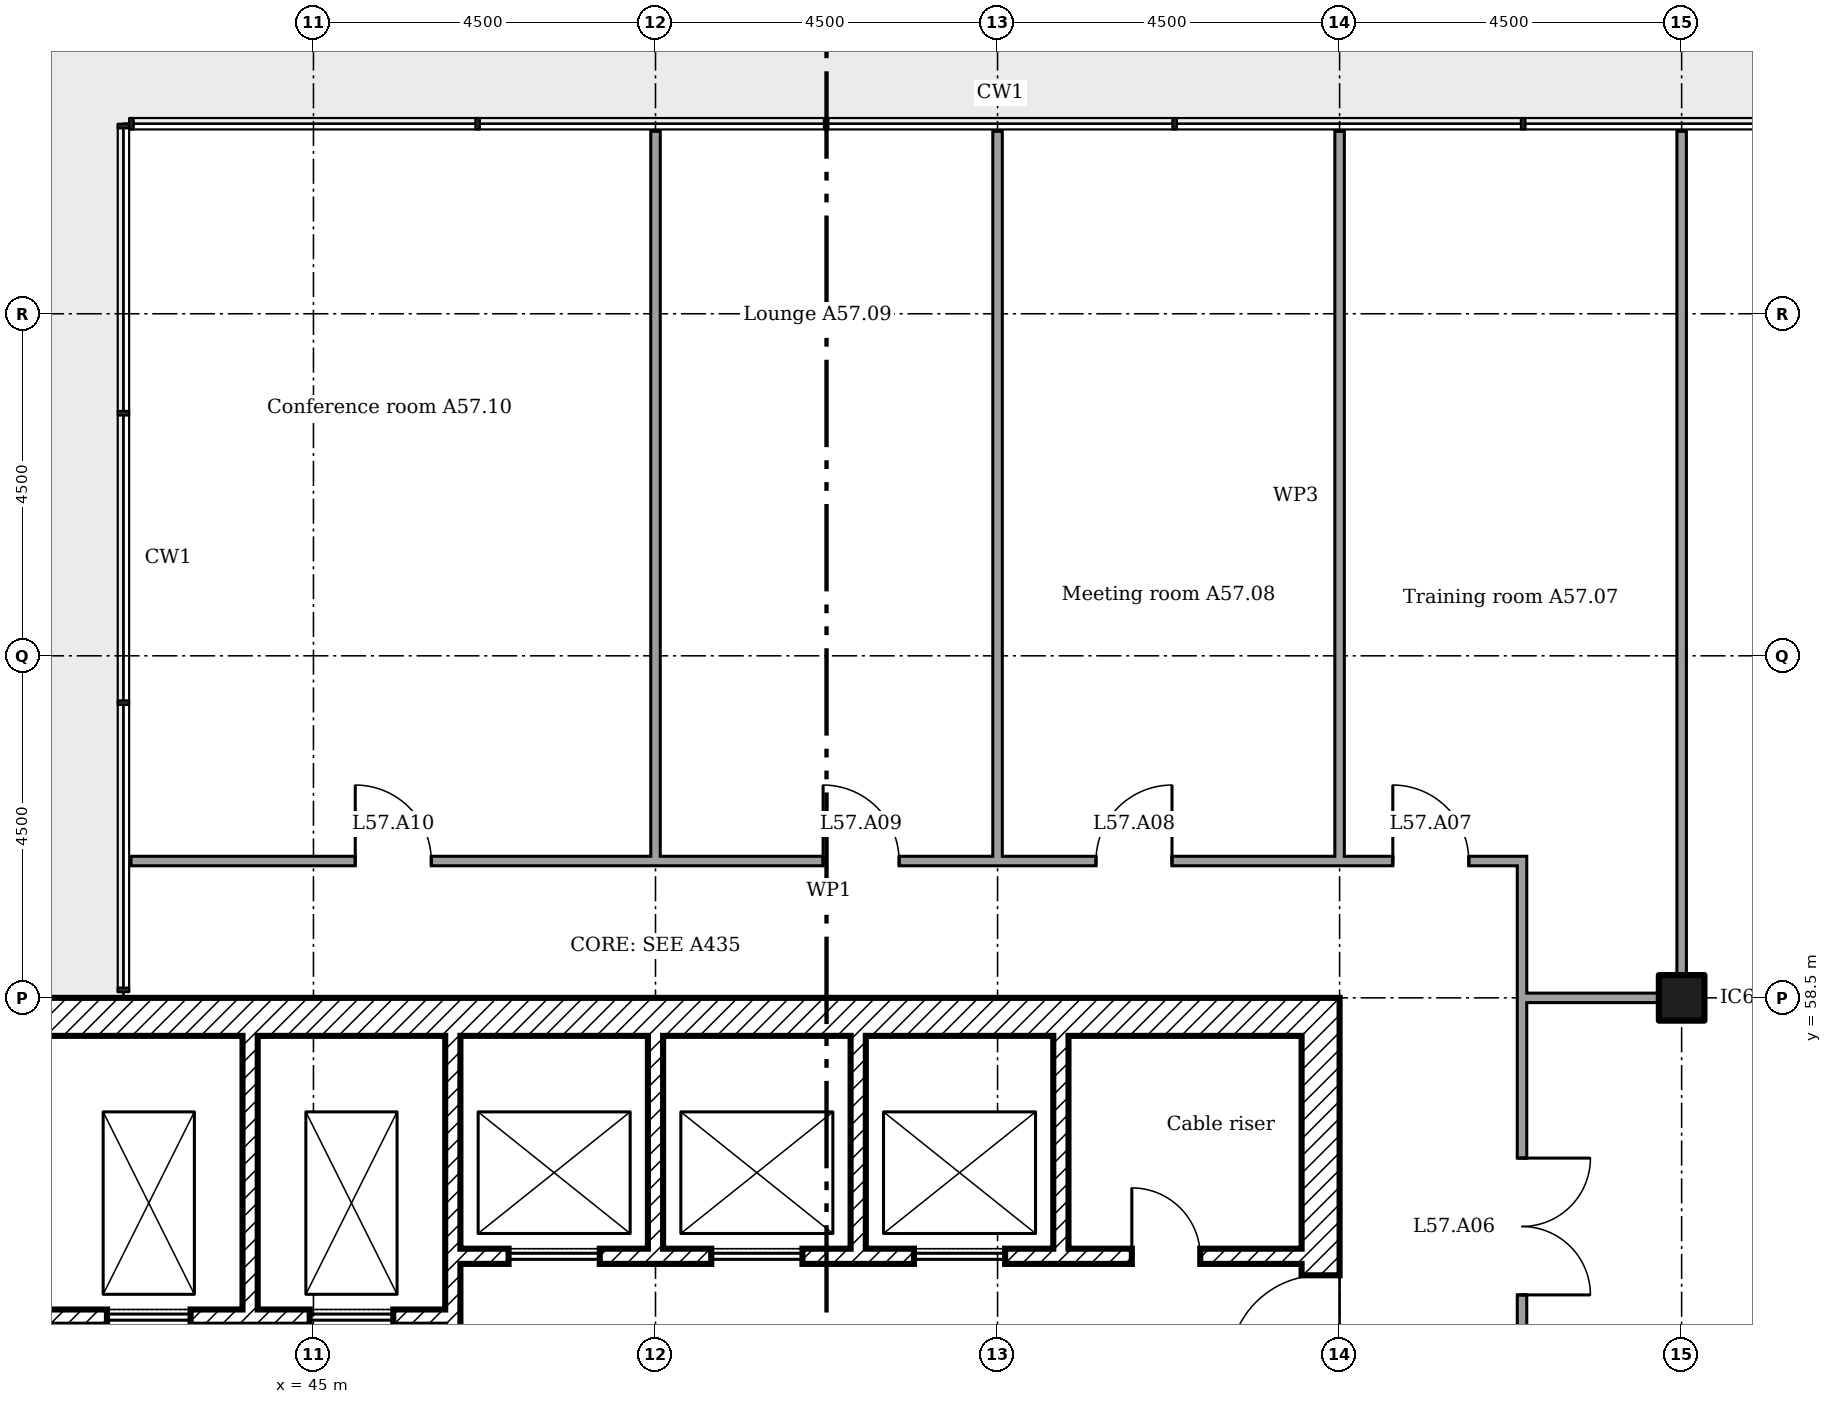
"""IFC4 building model, lengths in metres.
Left out: names, types, materials, properties, quantities, classifications, styles, units other than length and angle.
Written with IfcOpenShell. Run it as: python <this file> out.ifc"""

import sys

from ifc_helpers import new_model, si_unit, direction, frame, frame_2d, origin, origin_2d, place, context, subcontext, project, spatial, rectangle, extrude, element, fill, save


model = new_model("IFC4")
c1 = context("Model", 3, precision=1e-05, world=origin(), true_north=direction((0.0, 1.0)))
c2 = subcontext(c1, "Body", "Model", "MODEL_VIEW")
j1 = project(units=[si_unit("LENGTHUNIT", "METRE"), si_unit("PLANEANGLEUNIT", "RADIAN")], contexts=[c1])
p1 = place(None, origin())
s1 = spatial("IfcSite", under=j1, at=p1, CompositionType="ELEMENT")
p2 = place(p1, origin())
s2 = spatial("IfcBuilding", under=s1, at=p2, CompositionType="ELEMENT")
p3 = place(p2, frame((0.0, 0.0, 224.4)))
s3 = spatial("IfcBuildingStorey", under=s2, at=p3, CompositionType="ELEMENT", Elevation=224.4)
p4 = place(p3, frame((63.0, 58.5, 0.0)))
e1 = element("IfcColumn", 1, at=p4, inside=s3, PredefinedType="COLUMN", context=c2, shape_type="SweptSolid", body=[
    extrude(rectangle(XDim=0.6, YDim=0.6, at=origin_2d()), origin(), (0.0, 0.0, 1.0), 3.6),
])
p5 = place(p3, frame((58.25, 40.5, 0.0), z_axis=(0.0, 0.0, 1.0), x_axis=(0.0, 1.0, 0.0)))
e2 = element("IfcWall", 2, at=p5, inside=s3, PredefinedType="SHEAR", context=c2, shape_type="SweptSolid", body=[
    extrude(rectangle(XDim=18.0, YDim=0.5, at=frame_2d((9.0, 0.0))), origin(), (0.0, 0.0, 1.0), 3.35),
])
p6 = place(p5, frame((13.15, 0.0, 0.0)))
e3 = element("IfcOpeningElement", 3, at=p6, cuts=e2, PredefinedType="OPENING", context=c2, shape_type="SweptSolid", body=[
    extrude(rectangle(XDim=1.2, YDim=2.1, at=frame_2d((0.6, 1.05))), frame((0.0, 0.26, 0.0), z_axis=(0.0, -1.0, 0.0), x_axis=(1.0, 0.0, 0.0)), (0.0, 0.0, 1.0), 0.52),
])
p7 = place(p5, frame((3.9, 0.0, 0.0)))
e4 = element("IfcOpeningElement", 4, at=p7, cuts=e2, PredefinedType="OPENING", context=c2, shape_type="SweptSolid", body=[
    extrude(rectangle(XDim=1.8, YDim=2.1, at=frame_2d((0.9, 1.05))), frame((0.0, 0.26, 0.0), z_axis=(0.0, -1.0, 0.0), x_axis=(1.0, 0.0, 0.0)), (0.0, 0.0, 1.0), 0.52),
])
p8 = place(p5, frame((11.525, 0.0, 0.0)))
e5 = element("IfcOpeningElement", 5, at=p8, cuts=e2, PredefinedType="OPENING", context=c2, shape_type="SweptSolid", body=[
    extrude(rectangle(XDim=1.0, YDim=2.1, at=frame_2d((0.5, 1.05))), frame((0.0, 0.26, 0.0), z_axis=(0.0, -1.0, 0.0), x_axis=(1.0, 0.0, 0.0)), (0.0, 0.0, 1.0), 0.52),
])
p9 = place(p3, frame((40.5, 58.25, 0.0)))
e6 = element("IfcWall", 6, at=p9, inside=s3, PredefinedType="SHEAR", context=c2, shape_type="SweptSolid", body=[
    extrude(rectangle(XDim=17.5, YDim=0.5, at=frame_2d((8.75, 0.0))), origin(), (0.0, 0.0, 1.0), 3.35),
])
p10 = place(p3, frame((44.167, 58.0, 0.0), z_axis=(0.0, 0.0, 1.0), x_axis=(0.0, -1.0, 0.0)))
e7 = element("IfcWall", 7, at=p10, inside=s3, PredefinedType="SHEAR", context=c2, shape_type="SweptSolid", body=[
    extrude(rectangle(XDim=3.6, YDim=0.2, at=frame_2d((1.8, 0.0))), origin(), (0.0, 0.0, 1.0), 3.35),
])
p11 = place(p3, frame((46.833, 58.0, 0.0), z_axis=(0.0, 0.0, 1.0), x_axis=(0.0, -1.0, 0.0)))
e8 = element("IfcWall", 8, at=p11, inside=s3, PredefinedType="SHEAR", context=c2, shape_type="SweptSolid", body=[
    extrude(rectangle(XDim=4.7, YDim=0.2, at=frame_2d((2.35, 0.0))), origin(), (0.0, 0.0, 1.0), 3.35),
])
for number, where, z_axis, x_axis in (
    (9, (49.5, 58.0, 0.0), (0.0, 0.0, 1.0), (0.0, -1.0, 0.0)),
    (10, (52.167, 58.0, 0.0), (0.0, 0.0, 1.0), (0.0, -1.0, 0.0)),
    (11, (54.833, 58.0, 0.0), (0.0, 0.0, 1.0), (0.0, -1.0, 0.0)),
):
    element("IfcWall", number, at=place(p3, frame(where, z_axis=z_axis, x_axis=x_axis)), inside=s3, PredefinedType="SHEAR", context=c2, shape_type="SweptSolid", body=[
        extrude(rectangle(XDim=2.8, YDim=0.2, at=frame_2d((1.4, 0.0))), origin(), (0.0, 0.0, 1.0), 3.35),
    ])
p12 = place(p3, frame((46.933, 55.1, 0.0)))
e12 = element("IfcWall", 12, at=p12, inside=s3, PredefinedType="SHEAR", context=c2, shape_type="SweptSolid", body=[
    extrude(rectangle(XDim=11.067, YDim=0.2, at=frame_2d((5.533, 0.0))), origin(), (0.0, 0.0, 1.0), 3.35),
])
p13 = place(p12, frame((8.833, 0.0, 0.0)))
e13 = element("IfcOpeningElement", 13, at=p13, cuts=e12, PredefinedType="OPENING", context=c2, shape_type="SweptSolid", body=[
    extrude(rectangle(XDim=0.9, YDim=2.1, at=frame_2d((0.45, 1.05))), frame((0.0, 0.11, 0.0), z_axis=(0.0, -1.0, 0.0), x_axis=(1.0, 0.0, 0.0)), (0.0, 0.0, 1.0), 0.22),
])
p14 = place(p12, frame((0.633, 0.0, 0.0)))
e14 = element("IfcOpeningElement", 14, at=p14, cuts=e12, PredefinedType="OPENING", context=c2, shape_type="SweptSolid", body=[
    extrude(rectangle(XDim=1.2, YDim=2.1, at=frame_2d((0.6, 1.05))), frame((0.0, 0.11, 0.0), z_axis=(0.0, -1.0, 0.0), x_axis=(1.0, 0.0, 0.0)), (0.0, 0.0, 1.0), 0.22),
])
p15 = place(p12, frame((3.3, 0.0, 0.0)))
e15 = element("IfcOpeningElement", 15, at=p15, cuts=e12, PredefinedType="OPENING", context=c2, shape_type="SweptSolid", body=[
    extrude(rectangle(XDim=1.2, YDim=2.1, at=frame_2d((0.6, 1.05))), frame((0.0, 0.11, 0.0), z_axis=(0.0, -1.0, 0.0), x_axis=(1.0, 0.0, 0.0)), (0.0, 0.0, 1.0), 0.22),
])
p16 = place(p12, frame((5.967, 0.0, 0.0)))
e16 = element("IfcOpeningElement", 16, at=p16, cuts=e12, PredefinedType="OPENING", context=c2, shape_type="SweptSolid", body=[
    extrude(rectangle(XDim=1.2, YDim=2.1, at=frame_2d((0.6, 1.05))), frame((0.0, 0.11, 0.0), z_axis=(0.0, -1.0, 0.0), x_axis=(1.0, 0.0, 0.0)), (0.0, 0.0, 1.0), 0.22),
])
p17 = place(p3, frame((41.0, 54.3, 0.0)))
e17 = element("IfcWall", 17, at=p17, inside=s3, PredefinedType="SHEAR", context=c2, shape_type="SweptSolid", body=[
    extrude(rectangle(XDim=5.733, YDim=0.2, at=frame_2d((2.867, 0.0))), origin(), (0.0, 0.0, 1.0), 3.35),
])
p18 = place(p17, frame((1.283, 0.0, 0.0)))
e18 = element("IfcOpeningElement", 18, at=p18, cuts=e17, PredefinedType="OPENING", context=c2, shape_type="SweptSolid", body=[
    extrude(rectangle(XDim=1.1, YDim=2.1, at=frame_2d((0.55, 1.05))), frame((0.0, 0.11, 0.0), z_axis=(0.0, -1.0, 0.0), x_axis=(1.0, 0.0, 0.0)), (0.0, 0.0, 1.0), 0.22),
])
p19 = place(p17, frame((3.95, 0.0, 0.0)))
e19 = element("IfcOpeningElement", 19, at=p19, cuts=e17, PredefinedType="OPENING", context=c2, shape_type="SweptSolid", body=[
    extrude(rectangle(XDim=1.1, YDim=2.1, at=frame_2d((0.55, 1.05))), frame((0.0, 0.11, 0.0), z_axis=(0.0, -1.0, 0.0), x_axis=(1.0, 0.0, 0.0)), (0.0, 0.0, 1.0), 0.22),
])
p20 = place(p3, frame((60.9, 58.5, 0.0)))
e20 = element("IfcWall", 20, at=p20, inside=s3, PredefinedType="PARTITIONING", context=c2, shape_type="SweptSolid", body=[
    extrude(rectangle(XDim=2.163, YDim=0.125, at=frame_2d((1.081, 0.0))), origin(), (0.0, 0.0, 1.0), 2.676),
])
p21 = place(p3, frame((42.6, 60.3, 0.0)))
e21 = element("IfcWall", 21, at=p21, inside=s3, PredefinedType="PARTITIONING", context=c2, shape_type="SweptSolid", body=[
    extrude(rectangle(XDim=18.362, YDim=0.125, at=frame_2d((9.181, 0.0))), origin(), (0.0, 0.0, 1.0), 3.45),
])
p22 = place(p21, frame((16.6, 0.0, 0.0)))
e22 = element("IfcOpeningElement", 22, at=p22, cuts=e21, PredefinedType="OPENING", context=c2, shape_type="SweptSolid", body=[
    extrude(rectangle(XDim=1.0, YDim=2.1, at=frame_2d((0.5, 1.05))), frame((0.0, 0.073, 0.0), z_axis=(0.0, -1.0, 0.0), x_axis=(1.0, 0.0, 0.0)), (0.0, 0.0, 1.0), 0.145),
])
p23 = place(p21, frame((12.695, 0.0, 0.0)))
e23 = element("IfcOpeningElement", 23, at=p23, cuts=e21, PredefinedType="OPENING", context=c2, shape_type="SweptSolid", body=[
    extrude(rectangle(XDim=1.0, YDim=2.1, at=frame_2d((0.5, 1.05))), frame((0.0, 0.073, 0.0), z_axis=(0.0, -1.0, 0.0), x_axis=(1.0, 0.0, 0.0)), (0.0, 0.0, 1.0), 0.145),
])
p24 = place(p21, frame((9.105, 0.0, 0.0)))
e24 = element("IfcOpeningElement", 24, at=p24, cuts=e21, PredefinedType="OPENING", context=c2, shape_type="SweptSolid", body=[
    extrude(rectangle(XDim=1.0, YDim=2.1, at=frame_2d((0.5, 1.05))), frame((0.0, 0.073, 0.0), z_axis=(0.0, -1.0, 0.0), x_axis=(1.0, 0.0, 0.0)), (0.0, 0.0, 1.0), 0.145),
])
p25 = place(p21, frame((2.95, 0.0, 0.0)))
e25 = element("IfcOpeningElement", 25, at=p25, cuts=e21, PredefinedType="OPENING", context=c2, shape_type="SweptSolid", body=[
    extrude(rectangle(XDim=1.0, YDim=2.1, at=frame_2d((0.5, 1.05))), frame((0.0, 0.073, 0.0), z_axis=(0.0, -1.0, 0.0), x_axis=(1.0, 0.0, 0.0)), (0.0, 0.0, 1.0), 0.145),
])
for number, where, z_axis, x_axis in (
    (26, (49.5, 60.3, 0.0), (0.0, 0.0, 1.0), (0.0, 1.0, 0.0)),
    (27, (54.0, 60.3, 0.0), (0.0, 0.0, 1.0), (0.0, 1.0, 0.0)),
):
    element("IfcWall", number, at=place(p3, frame(where, z_axis=z_axis, x_axis=x_axis)), inside=s3, PredefinedType="PARTITIONING", context=c2, shape_type="SweptSolid", body=[
        extrude(rectangle(XDim=9.6, YDim=0.125, at=frame_2d((4.8, 0.0))), origin(), (0.0, 0.0, 1.0), 2.772),
    ])
p26 = place(p3, frame((58.5, 60.3, 0.0), z_axis=(0.0, 0.0, 1.0), x_axis=(0.0, 1.0, 0.0)))
e28 = element("IfcWall", 28, at=p26, inside=s3, PredefinedType="MOVABLE", context=c2, shape_type="SweptSolid", body=[
    extrude(rectangle(XDim=9.6, YDim=0.125, at=frame_2d((4.8, 0.0))), origin(), (0.0, 0.0, 1.0), 2.772),
])
p27 = place(p3, frame((60.9, 50.762, 0.0), z_axis=(0.0, 0.0, 1.0), x_axis=(0.0, 1.0, 0.0)))
e29 = element("IfcWall", 29, at=p27, inside=s3, PredefinedType="PARTITIONING", context=c2, shape_type="SweptSolid", body=[
    extrude(rectangle(XDim=9.475, YDim=0.125, at=frame_2d((4.738, 0.0))), origin(), (0.0, 0.0, 1.0), 3.45),
])
p28 = place(p27, frame((3.83, 0.0, 0.0)))
e30 = element("IfcOpeningElement", 30, at=p28, cuts=e29, PredefinedType="OPENING", context=c2, shape_type="SweptSolid", body=[
    extrude(rectangle(XDim=1.8, YDim=2.1, at=frame_2d((0.9, 1.05))), frame((0.0, 0.073, 0.0), z_axis=(0.0, -1.0, 0.0), x_axis=(1.0, 0.0, 0.0)), (0.0, 0.0, 1.0), 0.145),
])
p29 = place(p3, frame((63.0, 58.562, 0.0), z_axis=(0.0, 0.0, 1.0), x_axis=(0.0, 1.0, 0.0)))
e31 = element("IfcWall", 31, at=p29, inside=s3, PredefinedType="PARTITIONING", context=c2, shape_type="SweptSolid", body=[
    extrude(rectangle(XDim=11.337, YDim=0.125, at=frame_2d((5.669, 0.0))), origin(), (0.0, 0.0, 1.0), 2.772),
])
p30 = place(p6, origin())
e32 = element("IfcDoor", 32, at=p30, inside=s3, OperationType="SINGLE_SWING_RIGHT", PredefinedType="DOOR", context=c2, shape_type="SweptSolid", body=[
    extrude(rectangle(XDim=1.2, YDim=2.1, at=frame_2d((0.6, 1.05))), frame((0.0, 0.025, 0.0), z_axis=(0.0, -1.0, 0.0), x_axis=(1.0, 0.0, 0.0)), (0.0, 0.0, 1.0), 0.05),
])
fill(e3, e32)
p31 = place(p13, origin())
e33 = element("IfcDoor", 33, at=p31, inside=s3, OperationType="SINGLE_SWING_RIGHT", PredefinedType="DOOR", context=c2, shape_type="SweptSolid", body=[
    extrude(rectangle(XDim=0.9, YDim=2.1, at=frame_2d((0.45, 1.05))), frame((0.0, 0.025, 0.0), z_axis=(0.0, -1.0, 0.0), x_axis=(1.0, 0.0, 0.0)), (0.0, 0.0, 1.0), 0.05),
])
fill(e13, e33)
p32 = place(p18, origin())
e34 = element("IfcDoor", 34, at=p32, inside=s3, OperationType="SLIDING_TO_LEFT", PredefinedType="DOOR", context=c2, shape_type="SweptSolid", body=[
    extrude(rectangle(XDim=1.1, YDim=2.1, at=frame_2d((0.55, 1.05))), frame((0.0, 0.025, 0.0), z_axis=(0.0, -1.0, 0.0), x_axis=(1.0, 0.0, 0.0)), (0.0, 0.0, 1.0), 0.05),
])
fill(e18, e34)
p33 = place(p19, origin())
e35 = element("IfcDoor", 35, at=p33, inside=s3, OperationType="SLIDING_TO_LEFT", PredefinedType="DOOR", context=c2, shape_type="SweptSolid", body=[
    extrude(rectangle(XDim=1.1, YDim=2.1, at=frame_2d((0.55, 1.05))), frame((0.0, 0.025, 0.0), z_axis=(0.0, -1.0, 0.0), x_axis=(1.0, 0.0, 0.0)), (0.0, 0.0, 1.0), 0.05),
])
fill(e19, e35)
p34 = place(p14, origin())
e36 = element("IfcDoor", 36, at=p34, inside=s3, OperationType="SLIDING_TO_LEFT", PredefinedType="DOOR", context=c2, shape_type="SweptSolid", body=[
    extrude(rectangle(XDim=1.2, YDim=2.1, at=frame_2d((0.6, 1.05))), frame((0.0, 0.025, 0.0), z_axis=(0.0, -1.0, 0.0), x_axis=(1.0, 0.0, 0.0)), (0.0, 0.0, 1.0), 0.05),
])
fill(e14, e36)
p35 = place(p15, origin())
e37 = element("IfcDoor", 37, at=p35, inside=s3, OperationType="SLIDING_TO_LEFT", PredefinedType="DOOR", context=c2, shape_type="SweptSolid", body=[
    extrude(rectangle(XDim=1.2, YDim=2.1, at=frame_2d((0.6, 1.05))), frame((0.0, 0.025, 0.0), z_axis=(0.0, -1.0, 0.0), x_axis=(1.0, 0.0, 0.0)), (0.0, 0.0, 1.0), 0.05),
])
fill(e15, e37)
p36 = place(p16, origin())
e38 = element("IfcDoor", 38, at=p36, inside=s3, OperationType="SLIDING_TO_LEFT", PredefinedType="DOOR", context=c2, shape_type="SweptSolid", body=[
    extrude(rectangle(XDim=1.2, YDim=2.1, at=frame_2d((0.6, 1.05))), frame((0.0, 0.025, 0.0), z_axis=(0.0, -1.0, 0.0), x_axis=(1.0, 0.0, 0.0)), (0.0, 0.0, 1.0), 0.05),
])
fill(e16, e38)
p37 = place(p28, frame((1.8, 0.0, 0.0), x_axis=(-1.0, 0.0, 0.0)))
e39 = element("IfcDoor", 39, at=p37, inside=s3, OperationType="DOUBLE_DOOR_SINGLE_SWING", PredefinedType="DOOR", context=c2, shape_type="SweptSolid", body=[
    extrude(rectangle(XDim=1.8, YDim=2.1, at=frame_2d((0.9, 1.05))), frame((0.0, 0.025, 0.0), z_axis=(0.0, -1.0, 0.0), x_axis=(1.0, 0.0, 0.0)), (0.0, 0.0, 1.0), 0.05),
])
fill(e30, e39)
p38 = place(p22, origin())
e40 = element("IfcDoor", 40, at=p38, inside=s3, OperationType="SINGLE_SWING_RIGHT", PredefinedType="DOOR", context=c2, shape_type="SweptSolid", body=[
    extrude(rectangle(XDim=1.0, YDim=2.1, at=frame_2d((0.5, 1.05))), frame((0.0, 0.025, 0.0), z_axis=(0.0, -1.0, 0.0), x_axis=(1.0, 0.0, 0.0)), (0.0, 0.0, 1.0), 0.05),
])
fill(e22, e40)
p39 = place(p23, origin())
e41 = element("IfcDoor", 41, at=p39, inside=s3, OperationType="SINGLE_SWING_LEFT", PredefinedType="DOOR", context=c2, shape_type="SweptSolid", body=[
    extrude(rectangle(XDim=1.0, YDim=2.1, at=frame_2d((0.5, 1.05))), frame((0.0, 0.025, 0.0), z_axis=(0.0, -1.0, 0.0), x_axis=(1.0, 0.0, 0.0)), (0.0, 0.0, 1.0), 0.05),
])
fill(e23, e41)
p40 = place(p24, origin())
e42 = element("IfcDoor", 42, at=p40, inside=s3, OperationType="SINGLE_SWING_RIGHT", PredefinedType="DOOR", context=c2, shape_type="SweptSolid", body=[
    extrude(rectangle(XDim=1.0, YDim=2.1, at=frame_2d((0.5, 1.05))), frame((0.0, 0.025, 0.0), z_axis=(0.0, -1.0, 0.0), x_axis=(1.0, 0.0, 0.0)), (0.0, 0.0, 1.0), 0.05),
])
fill(e24, e42)
p41 = place(p25, origin())
e43 = element("IfcDoor", 43, at=p41, inside=s3, OperationType="SINGLE_SWING_RIGHT", PredefinedType="DOOR", context=c2, shape_type="SweptSolid", body=[
    extrude(rectangle(XDim=1.0, YDim=2.1, at=frame_2d((0.5, 1.05))), frame((0.0, 0.025, 0.0), z_axis=(0.0, -1.0, 0.0), x_axis=(1.0, 0.0, 0.0)), (0.0, 0.0, 1.0), 0.05),
])
fill(e25, e43)
save(model, sys.argv[1])
